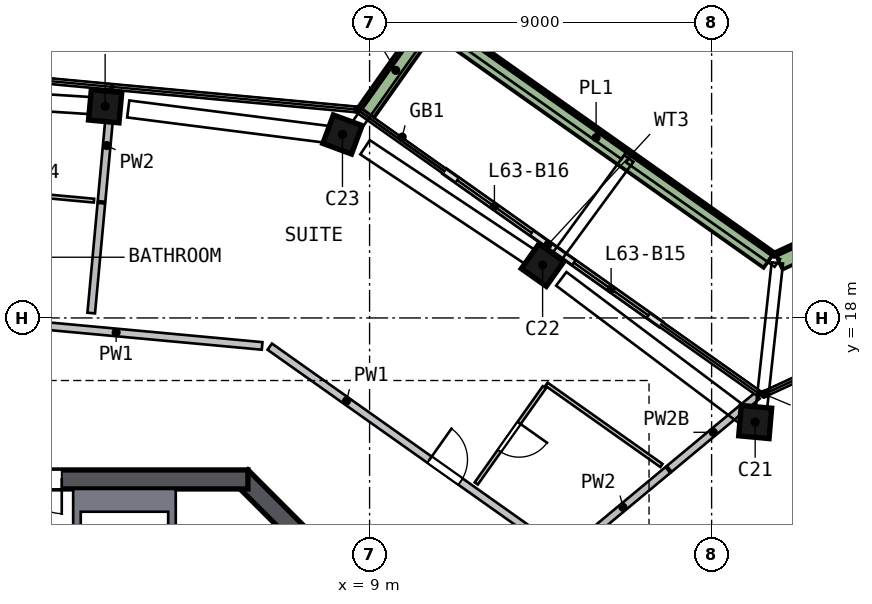
"""IFC4 building model, lengths in metres.
Left out: names, types, materials, properties, quantities, classifications, styles, units other than length and angle.
Written with IfcOpenShell. Run it as: python <this file> out.ifc"""

import sys

from ifc_helpers import new_model, si_unit, direction, frame, frame_2d, origin, origin_2d, place, context, subcontext, project, spatial, polyline, rectangle, outline, extrude, element, fill, save


model = new_model("IFC4")
c1 = context("Model", 3, precision=1e-05, world=origin(), true_north=direction((0.0, 1.0)))
c2 = subcontext(c1, "Body", "Model", "MODEL_VIEW")
j1 = project(units=[si_unit("LENGTHUNIT", "METRE"), si_unit("PLANEANGLEUNIT", "RADIAN")], contexts=[c1])
p1 = place(None, origin())
s1 = spatial("IfcSite", under=j1, at=p1, CompositionType="ELEMENT")
p2 = place(p1, origin())
s2 = spatial("IfcBuilding", under=s1, at=p2, CompositionType="ELEMENT")
p3 = place(p2, frame((0.0, 0.0, 256.0)))
s3 = spatial("IfcBuildingStorey", under=s2, at=p3, CompositionType="ELEMENT", Elevation=256.0)
p4 = place(p3, frame((19.234, 15.152, 0.0), z_axis=(-0.072821974, 0.090761416, 0.993206587), x_axis=(0.993171917, -0.084404177, 0.080532472)))
e1 = element("IfcColumn", 1, at=p4, inside=s3, PredefinedType="COLUMN", context=c2, shape_type="SweptSolid", body=[
    extrude(rectangle(XDim=0.8, YDim=0.8, at=origin_2d()), origin(), (0.0, 0.0, 1.0), 3.212),
])
p5 = place(p3, frame((13.664, 19.313, 0.0), z_axis=(-0.092399066, 0.06418503, 0.993651194), x_axis=(-0.811237258, 0.573792389, -0.112500692)))
e2 = element("IfcColumn", 2, at=p5, inside=s3, PredefinedType="COLUMN", context=c2, shape_type="SweptSolid", body=[
    extrude(rectangle(XDim=0.8, YDim=0.8, at=origin_2d()), origin(), (0.0, 0.0, 1.0), 3.21),
])
p6 = place(p3, frame((8.418, 22.781, 0.0), z_axis=(-0.108711633, 0.03907537, 0.993305037), x_axis=(0.931868906, -0.343913051, 0.115516902)))
e3 = element("IfcColumn", 3, at=p6, inside=s3, PredefinedType="COLUMN", context=c2, shape_type="SweptSolid", body=[
    extrude(rectangle(XDim=0.8, YDim=0.8, at=origin_2d()), origin(), (0.0, 0.0, 1.0), 3.211),
])
p7 = place(p3, frame((2.177, 23.558, 0.0), z_axis=(-0.112095822, 0.009430042, 0.993652656), x_axis=(-0.98941317, 0.091695583, -0.112487775)))
e4 = element("IfcColumn", 4, at=p7, inside=s3, PredefinedType="COLUMN", context=c2, shape_type="SweptSolid", body=[
    extrude(rectangle(XDim=0.8, YDim=0.8, at=origin_2d()), origin(), (0.0, 0.0, 1.0), 3.21),
])
p8 = place(p3, frame((13.823, 5.622, 0.0), z_axis=(0.0, 0.0, 1.0), x_axis=(-0.707106781, 0.707106781, 0.0)))
e5 = element("IfcWall", 5, at=p8, inside=s3, PredefinedType="SHEAR", context=c2, shape_type="SweptSolid", body=[
    extrude(rectangle(XDim=11.598, YDim=0.5, at=frame_2d((5.799, 0.0))), origin(), (0.0, 0.0, 1.0), 3.5),
])
p9 = place(p8, frame((2.099, 0.0, 0.0)))
e6 = element("IfcOpeningElement", 6, at=p9, cuts=e5, PredefinedType="OPENING", context=c2, shape_type="SweptSolid", body=[
    extrude(rectangle(XDim=1.2, YDim=2.1, at=frame_2d((0.6, 1.05))), frame((0.0, 0.26, 0.0), z_axis=(0.0, -1.0, 0.0), x_axis=(1.0, 0.0, 0.0)), (0.0, 0.0, 1.0), 0.52),
])
p10 = place(p3, frame((5.799, 13.75, 0.0), z_axis=(0.0, 0.0, 1.0), x_axis=(-1.0, 0.0, 0.0)))
e7 = element("IfcWall", 7, at=p10, inside=s3, PredefinedType="SHEAR", context=c2, shape_type="SweptSolid", body=[
    extrude(rectangle(XDim=11.598, YDim=0.5, at=frame_2d((5.799, 0.0))), origin(), (0.0, 0.0, 1.0), 3.5),
])
p11 = place(p10, frame((4.899, 0.0, 0.0)))
e8 = element("IfcOpeningElement", 8, at=p11, cuts=e7, PredefinedType="OPENING", context=c2, shape_type="SweptSolid", body=[
    extrude(rectangle(XDim=1.8, YDim=2.1, at=frame_2d((0.9, 1.05))), frame((0.0, 0.26, 0.0), z_axis=(0.0, -1.0, 0.0), x_axis=(1.0, 0.0, 0.0)), (0.0, 0.0, 1.0), 0.52),
])
p12 = place(p3, frame((16.662, 17.836, 0.0), z_axis=(0.0, 0.0, 1.0), x_axis=(-0.816354387, 0.577551309, 0.0)))
e9 = element("IfcWall", 9, at=p12, inside=s3, PredefinedType="SOLIDWALL", context=c2, shape_type="SweptSolid", body=[
    extrude(rectangle(XDim=3.3, YDim=0.15, at=frame_2d((1.65, 0.0))), origin(), (0.0, 0.0, 1.0), 2.525),
])
p13 = place(p12, frame((0.4, 0.0, 0.0)))
e10 = element("IfcOpeningElement", 10, at=p13, cuts=e9, PredefinedType="OPENING", context=c2, shape_type="SweptSolid", body=[
    extrude(rectangle(XDim=2.4, YDim=2.4, at=frame_2d((1.2, 1.2))), frame((0.0, 0.085, 0.0), z_axis=(0.0, -1.0, 0.0), x_axis=(1.0, 0.0, 0.0)), (0.0, 0.0, 1.0), 0.17),
])
p14 = place(p3, frame((13.968, 19.742, 0.0), z_axis=(0.0, 0.0, 1.0), x_axis=(-0.81632055, 0.577599134, 0.0)))
e11 = element("IfcWall", 11, at=p14, inside=s3, PredefinedType="SOLIDWALL", context=c2, shape_type="SweptSolid", body=[
    extrude(rectangle(XDim=3.661, YDim=0.15, at=frame_2d((1.831, 0.0))), origin(), (0.0, 0.0, 1.0), 2.525),
])
p15 = place(p14, frame((0.861, 0.0, 0.0)))
e12 = element("IfcOpeningElement", 12, at=p15, cuts=e11, PredefinedType="OPENING", context=c2, shape_type="SweptSolid", body=[
    extrude(rectangle(XDim=2.4, YDim=2.4, at=frame_2d((1.2, 1.2))), frame((0.0, 0.085, 0.0), z_axis=(0.0, -1.0, 0.0), x_axis=(1.0, 0.0, 0.0)), (0.0, 0.0, 1.0), 0.17),
])
p16 = place(p3, frame((23.076, 21.027, 0.0), z_axis=(0.0, 0.0, 1.0), x_axis=(-0.908364393, -0.418179541, 0.0)))
e13 = element("IfcWall", 13, at=p16, inside=s3, PredefinedType="SOLIDWALL", context=c2, shape_type="SweptSolid", body=[
    extrude(rectangle(XDim=3.648, YDim=0.5, at=frame_2d((1.824, 0.0))), origin(), (0.0, 0.0, 1.0), 0.7),
])
p17 = place(p3, frame((19.513, 19.524, 0.0), z_axis=(0.0, 0.0, 1.0), x_axis=(-0.816341876, 0.577568992, 0.0)))
e14 = element("IfcWall", 14, at=p17, inside=s3, PredefinedType="SOLIDWALL", context=c2, shape_type="SweptSolid", body=[
    extrude(rectangle(XDim=11.152, YDim=0.5, at=frame_2d((5.576, 0.0))), origin(), (0.0, 0.0, 1.0), 0.7),
])
p18 = place(p3, frame((10.468, 25.617, 0.0), z_axis=(0.0, 0.0, 1.0), x_axis=(-0.577552948, -0.816353227, 0.0)))
e15 = element("IfcWall", 15, at=p18, inside=s3, PredefinedType="SOLIDWALL", context=c2, shape_type="SweptSolid", body=[
    extrude(rectangle(XDim=2.699, YDim=0.5, at=frame_2d((1.35, 0.0))), origin(), (0.0, 0.0, 1.0), 0.7),
])
p19 = place(p3, origin())
e16 = element("IfcWall", 16, at=p19, inside=s3, PredefinedType="SOLIDWALL", context=c2, shape_type="SweptSolid", body=[
    extrude(outline(polyline([(3.9, 9.9), (3.7, 9.9), (3.7, 12.9), (1.4, 12.9), (1.4, 9.9), (1.2, 9.9), (1.2, 13.5), (3.9, 13.5), (3.9, 9.9)])), origin(), (0.0, 0.0, 1.0), 3.19),
])
p20 = place(p3, frame((-2.904, 18.102, 0.0), z_axis=(0.0, 0.0, 1.0), x_axis=(0.995759095, -0.091999045, 0.0)))
e17 = element("IfcWall", 17, at=p20, inside=s3, PredefinedType="SOLIDWALL", context=c2, shape_type="SweptSolid", body=[
    extrude(rectangle(XDim=9.115, YDim=0.2, at=frame_2d((4.558, 0.0))), origin(), (0.0, 0.0, 1.0), 3.19),
])
p21 = place(p20, frame((0.2, 0.0, 0.0)))
e18 = element("IfcOpeningElement", 18, at=p21, cuts=e17, PredefinedType="OPENING", context=c2, shape_type="SweptSolid", body=[
    extrude(rectangle(XDim=1.0, YDim=2.1, at=frame_2d((0.5, 1.05))), frame((0.0, 0.11, 0.0), z_axis=(0.0, -1.0, 0.0), x_axis=(1.0, 0.0, 0.0)), (0.0, 0.0, 1.0), 0.22),
])
p22 = place(p3, frame((6.373, 17.245, 0.0), z_axis=(0.0, 0.0, 1.0), x_axis=(0.816328241, -0.577588264, 0.0)))
e19 = element("IfcWall", 19, at=p22, inside=s3, PredefinedType="SOLIDWALL", context=c2, shape_type="SweptSolid", body=[
    extrude(rectangle(XDim=9.316, YDim=0.2, at=frame_2d((4.658, 0.0))), origin(), (0.0, 0.0, 1.0), 3.19),
])
p23 = place(p22, frame((5.15, 0.0, 0.0)))
e20 = element("IfcOpeningElement", 20, at=p23, cuts=e19, PredefinedType="OPENING", context=c2, shape_type="SweptSolid", body=[
    extrude(rectangle(XDim=1.0, YDim=2.1, at=frame_2d((0.5, 1.05))), frame((0.0, 0.11, 0.0), z_axis=(0.0, -1.0, 0.0), x_axis=(1.0, 0.0, 0.0)), (0.0, 0.0, 1.0), 0.22),
])
p24 = place(p3, frame((1.675, 18.128, 0.0), z_axis=(0.0, 0.0, 1.0), x_axis=(0.092036166, 0.995755665, 0.0)))
e21 = element("IfcWall", 21, at=p24, inside=s3, PredefinedType="SOLIDWALL", context=c2, shape_type="SweptSolid", body=[
    extrude(rectangle(XDim=2.905, YDim=0.2, at=frame_2d((1.452, 0.0))), origin(), (0.0, 0.0, 1.0), 3.19),
])
p25 = place(p3, frame((1.947, 21.067, 0.0), z_axis=(0.0, 0.0, 1.0), x_axis=(0.091967389, 0.995762019, 0.0)))
e22 = element("IfcWall", 22, at=p25, inside=s3, PredefinedType="SOLIDWALL", context=c2, shape_type="SweptSolid", body=[
    extrude(rectangle(XDim=2.952, YDim=0.2, at=frame_2d((1.476, 0.0))), origin(), (0.0, 0.0, 1.0), 3.19),
])
p26 = place(p3, frame((14.485, 12.034, 0.0), z_axis=(0.0, 0.0, 1.0), x_axis=(0.769138135, 0.639082569, 0.0)))
e23 = element("IfcWall", 23, at=p26, inside=s3, PredefinedType="SOLIDWALL", context=c2, shape_type="SweptSolid", body=[
    extrude(rectangle(XDim=3.075, YDim=0.2, at=frame_2d((1.538, 0.0))), origin(), (0.0, 0.0, 1.0), 3.19),
])
p27 = place(p3, frame((16.885, 14.029, 0.0), z_axis=(0.0, 0.0, 1.0), x_axis=(0.76920386, 0.63900346, 0.0)))
e24 = element("IfcWall", 24, at=p27, inside=s3, PredefinedType="SOLIDWALL", context=c2, shape_type="SweptSolid", body=[
    extrude(rectangle(XDim=3.011, YDim=0.2, at=frame_2d((1.506, 0.0))), origin(), (0.0, 0.0, 1.0), 2.69),
])
p28 = place(p3, frame((15.639, 8.972, 0.0), z_axis=(0.0, 0.0, 1.0), x_axis=(0.908362647, 0.418183336, 0.0)))
e25 = element("IfcWall", 25, at=p28, inside=s3, PredefinedType="SOLIDWALL", context=c2, shape_type="SweptSolid", body=[
    extrude(rectangle(XDim=10.302, YDim=0.2, at=frame_2d((5.151, 0.0))), origin(), (0.0, 0.0, 1.0), 3.19),
])
p29 = place(p28, frame((2.95, 0.0, 0.0)))
e26 = element("IfcOpeningElement", 26, at=p29, cuts=e25, PredefinedType="OPENING", context=c2, shape_type="SweptSolid", body=[
    extrude(rectangle(XDim=1.0, YDim=2.1, at=frame_2d((0.5, 1.05))), frame((0.0, 0.11, 0.0), z_axis=(0.0, -1.0, 0.0), x_axis=(1.0, 0.0, 0.0)), (0.0, 0.0, 1.0), 0.22),
])
p30 = place(p3, frame((-0.941, 21.335, 0.0), z_axis=(0.0, 0.0, 1.0), x_axis=(0.995754192, -0.092052104, 0.0)))
e27 = element("IfcWall", 27, at=p30, inside=s3, PredefinedType="PARTITIONING", context=c2, shape_type="SweptSolid", body=[
    extrude(rectangle(XDim=2.7, YDim=0.1, at=frame_2d((1.35, 0.0))), origin(), (0.0, 0.0, 1.0), 3.19),
])
p31 = place(p3, frame((13.598, 16.175, 0.0), z_axis=(0.0, 0.0, 1.0), x_axis=(-0.577567137, -0.816343189, 0.0)))
e28 = element("IfcWall", 28, at=p31, inside=s3, PredefinedType="PARTITIONING", context=c2, shape_type="SweptSolid", body=[
    extrude(rectangle(XDim=3.1, YDim=0.1, at=frame_2d((1.55, 0.0))), origin(), (0.0, 0.0, 1.0), 3.19),
])
p32 = place(p31, frame((1.15, 0.0, 0.0)))
e29 = element("IfcOpeningElement", 29, at=p32, cuts=e28, PredefinedType="OPENING", context=c2, shape_type="SweptSolid", body=[
    extrude(rectangle(XDim=0.9, YDim=2.1, at=frame_2d((0.45, 1.05))), frame((0.0, 0.06, 0.0), z_axis=(0.0, -1.0, 0.0), x_axis=(1.0, 0.0, 0.0)), (0.0, 0.0, 1.0), 0.12),
])
p33 = place(p3, frame((13.656, 16.257, 0.0), z_axis=(0.0, 0.0, 1.0), x_axis=(0.816326196, -0.577591155, 0.0)))
e30 = element("IfcWall", 30, at=p33, inside=s3, PredefinedType="PARTITIONING", context=c2, shape_type="SweptSolid", body=[
    extrude(rectangle(XDim=3.704, YDim=0.1, at=frame_2d((1.852, 0.0))), origin(), (0.0, 0.0, 1.0), 3.19),
])
p34 = place(p13, origin())
e31 = element("IfcDoor", 31, at=p34, inside=s3, OperationType="SLIDING_TO_RIGHT", PredefinedType="DOOR", context=c2, shape_type="SweptSolid", body=[
    extrude(rectangle(XDim=2.4, YDim=2.4, at=frame_2d((1.2, 1.2))), frame((0.0, 0.025, 0.0), z_axis=(0.0, -1.0, 0.0), x_axis=(1.0, 0.0, 0.0)), (0.0, 0.0, 1.0), 0.05),
])
fill(e10, e31)
p35 = place(p15, origin())
e32 = element("IfcDoor", 32, at=p35, inside=s3, OperationType="SLIDING_TO_LEFT", PredefinedType="DOOR", context=c2, shape_type="SweptSolid", body=[
    extrude(rectangle(XDim=2.4, YDim=2.4, at=frame_2d((1.2, 1.2))), frame((0.0, 0.025, 0.0), z_axis=(0.0, -1.0, 0.0), x_axis=(1.0, 0.0, 0.0)), (0.0, 0.0, 1.0), 0.05),
])
fill(e12, e32)
p36 = place(p11, origin())
e33 = element("IfcDoor", 33, at=p36, inside=s3, OperationType="DOUBLE_DOOR_SINGLE_SWING", PredefinedType="DOOR", context=c2, shape_type="SweptSolid", body=[
    extrude(rectangle(XDim=1.8, YDim=2.1, at=frame_2d((0.9, 1.05))), frame((0.0, 0.025, 0.0), z_axis=(0.0, -1.0, 0.0), x_axis=(1.0, 0.0, 0.0)), (0.0, 0.0, 1.0), 0.05),
])
fill(e8, e33)
p37 = place(p23, origin())
e34 = element("IfcDoor", 34, at=p37, inside=s3, OperationType="SINGLE_SWING_LEFT", PredefinedType="DOOR", context=c2, shape_type="SweptSolid", body=[
    extrude(rectangle(XDim=1.0, YDim=2.1, at=frame_2d((0.5, 1.05))), frame((0.0, 0.025, 0.0), z_axis=(0.0, -1.0, 0.0), x_axis=(1.0, 0.0, 0.0)), (0.0, 0.0, 1.0), 0.05),
])
fill(e20, e34)
p38 = place(p32, origin())
e35 = element("IfcDoor", 35, at=p38, inside=s3, OperationType="SINGLE_SWING_LEFT", PredefinedType="DOOR", context=c2, shape_type="SweptSolid", body=[
    extrude(rectangle(XDim=0.9, YDim=2.1, at=frame_2d((0.45, 1.05))), frame((0.0, 0.025, 0.0), z_axis=(0.0, -1.0, 0.0), x_axis=(1.0, 0.0, 0.0)), (0.0, 0.0, 1.0), 0.05),
])
fill(e29, e35)
save(model, sys.argv[1])
